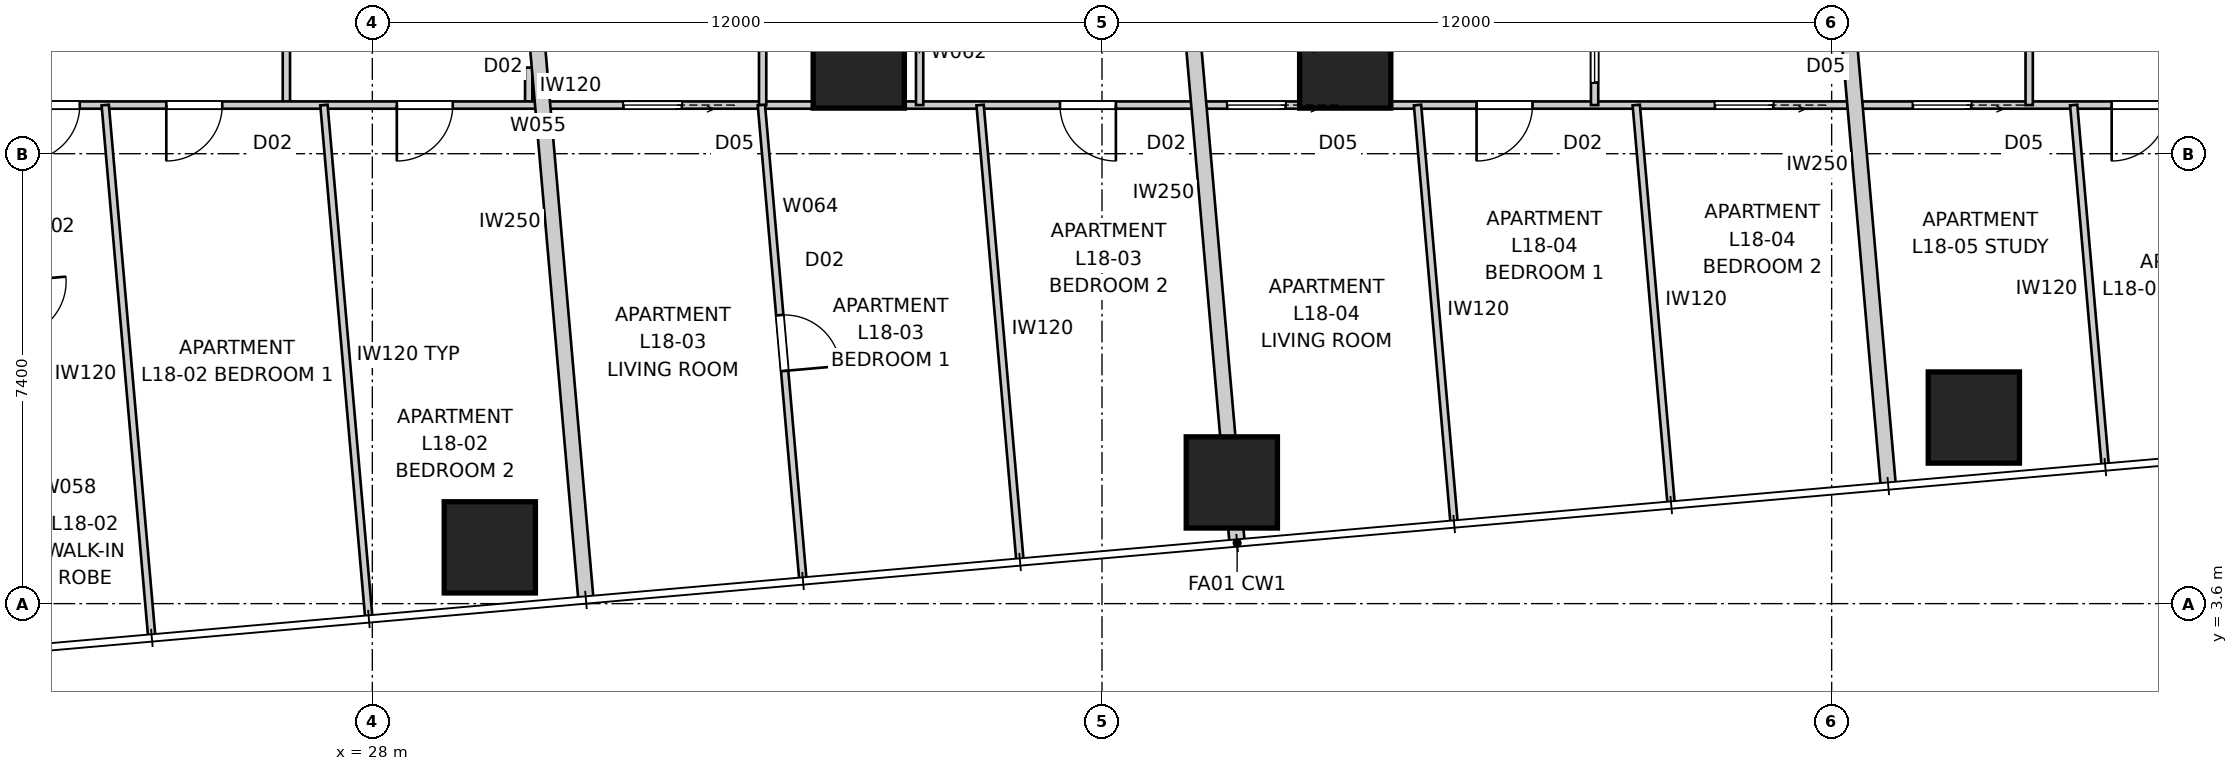
"""IFC4 building model, lengths in metres.
Left out: names, types, materials, properties, quantities, classifications, styles, units other than length and angle.
Written with IfcOpenShell. Run it as: python <this file> out.ifc"""

import sys

from ifc_helpers import new_model, si_unit, direction, frame, frame_2d, origin, origin_2d, place, context, subcontext, project, spatial, rectangle, extrude, element, fill, save


model = new_model("IFC4")
c1 = context("Model", 3, precision=1e-05, world=origin(), true_north=direction((0.0, 1.0)))
c2 = subcontext(c1, "Body", "Model", "MODEL_VIEW")
j1 = project(units=[si_unit("LENGTHUNIT", "METRE"), si_unit("PLANEANGLEUNIT", "RADIAN")], contexts=[c1])
p1 = place(None, origin())
s1 = spatial("IfcSite", under=j1, at=p1, CompositionType="ELEMENT")
p2 = place(p1, origin())
s2 = spatial("IfcBuilding", under=s1, at=p2, CompositionType="ELEMENT")
p3 = place(p2, frame((0.0, 0.0, 67.6)))
s3 = spatial("IfcBuildingStorey", under=s2, at=p3, CompositionType="ELEMENT", Elevation=67.6)
for number, where, z_axis, x_axis in (
    (1, (29.932, 4.526, 0.0), (0.0, 0.0, 1.0), (1.0, 0.0, 0.0)),
    (2, (42.135, 5.593, 0.0), (0.0, 0.0, 1.0), (1.0, 0.0, 0.0)),
    (3, (54.339, 6.661, 0.0), (0.0, 0.0, 1.0), (1.0, 0.0, 0.0)),
    (4, (36.0, 12.5, 0.0), (0.0, 0.0, 1.0), (1.0, 0.0, 0.0)),
    (5, (44.0, 12.5, 0.0), (0.0, 0.0, 1.0), (1.0, 0.0, 0.0)),
):
    element("IfcColumn", number, at=place(p3, frame(where, z_axis=z_axis, x_axis=x_axis)), inside=s3, PredefinedType="COLUMN", context=c2, shape_type="SweptSolid", body=[
        extrude(rectangle(XDim=1.5, YDim=1.5, at=origin_2d()), origin(), (0.0, 0.0, 1.0), 3.4),
    ])
p4 = place(p3, frame((42.222, 4.597, 0.0), z_axis=(0.0, 0.0, 1.0), x_axis=(-0.087147497287, 0.996195419442, 0.0)))
e6 = element("IfcWall", 6, at=p4, inside=s3, PredefinedType="PARTITIONING", context=c2, shape_type="SweptSolid", body=[
    extrude(rectangle(XDim=11.677, YDim=0.25, at=frame_2d((5.838, 0.0))), origin(), (0.0, 0.0, 1.0), 3.25),
])
p5 = place(p3, frame((52.932, 5.534, 0.0), z_axis=(0.0, 0.0, 1.0), x_axis=(-0.08716441141, 0.996193939644, 0.0)))
e7 = element("IfcWall", 7, at=p5, inside=s3, PredefinedType="PARTITIONING", context=c2, shape_type="SweptSolid", body=[
    extrude(rectangle(XDim=10.736, YDim=0.25, at=frame_2d((5.368, 0.0))), origin(), (0.0, 0.0, 1.0), 3.25),
])
p6 = place(p3, frame((31.513, 3.66, 0.0), z_axis=(0.0, 0.0, 1.0), x_axis=(-0.087153988028, 0.996194851608, 0.0)))
e8 = element("IfcWall", 8, at=p6, inside=s3, PredefinedType="PARTITIONING", context=c2, shape_type="SweptSolid", body=[
    extrude(rectangle(XDim=12.617, YDim=0.25, at=frame_2d((6.309, 0.0))), origin(), (0.0, 0.0, 1.0), 3.25),
])
p7 = place(p3, frame((26.586, 11.8, 0.0), z_axis=(0.0, 0.0, 1.0), x_axis=(0.0, 1.0, 0.0)))
e9 = element("IfcWall", 9, at=p7, inside=s3, PredefinedType="PARTITIONING", context=c2, shape_type="SweptSolid", body=[
    extrude(rectangle(XDim=4.4, YDim=0.12, at=frame_2d((2.2, 0.0))), origin(), (0.0, 0.0, 1.0), 3.25),
])
p8 = place(p7, frame((0.982, 0.0, 0.0)))
e10 = element("IfcOpeningElement", 10, at=p8, cuts=e9, PredefinedType="OPENING", context=c2, shape_type="SweptSolid", body=[
    extrude(rectangle(XDim=0.92, YDim=2.34, at=frame_2d((0.46, 1.17))), frame((0.0, 0.07, 0.0), z_axis=(0.0, -1.0, 0.0), x_axis=(1.0, 0.0, 0.0)), (0.0, 0.0, 1.0), 0.14),
])
p9 = place(p7, frame((3.112, 0.0, 0.0)))
e11 = element("IfcOpeningElement", 11, at=p9, cuts=e9, PredefinedType="OPENING", context=c2, shape_type="SweptSolid", body=[
    extrude(rectangle(XDim=0.96, YDim=2.1, at=frame_2d((0.48, 1.05))), frame((0.0, 0.07, 0.0), z_axis=(0.0, -1.0, 0.0), x_axis=(1.0, 0.0, 0.0)), (0.0, 0.0, 1.0), 0.14),
])
p10 = place(p3, frame((30.572, 12.417, 0.0), z_axis=(0.0, 0.0, 1.0), x_axis=(0.0, -1.0, 0.0)))
e12 = element("IfcWall", 12, at=p10, inside=s3, PredefinedType="PARTITIONING", context=c2, shape_type="SweptSolid", body=[
    extrude(rectangle(XDim=0.617, YDim=0.12, at=frame_2d((0.308, 0.0))), origin(), (0.0, 0.0, 1.0), 3.25),
])
p11 = place(p3, frame((58.2, 11.8, 0.0), z_axis=(0.0, 0.0, 1.0), x_axis=(-1.0, 0.0, 0.0)))
e13 = element("IfcWall", 13, at=p11, inside=s3, PredefinedType="PARTITIONING", context=c2, shape_type="SweptSolid", body=[
    extrude(rectangle(XDim=36.4, YDim=0.12, at=frame_2d((18.2, 0.0))), origin(), (0.0, 0.0, 1.0), 3.25),
])
p12 = place(p11, frame((11.12, 0.0, 0.0)))
e14 = element("IfcOpeningElement", 14, at=p12, cuts=e13, PredefinedType="OPENING", context=c2, shape_type="SweptSolid", body=[
    extrude(rectangle(XDim=0.92, YDim=2.34, at=frame_2d((0.46, 1.17))), frame((0.0, 0.07, 0.0), z_axis=(0.0, -1.0, 0.0), x_axis=(1.0, 0.0, 0.0)), (0.0, 0.0, 1.0), 0.14),
])
p13 = place(p11, frame((17.971, 0.0, 0.0)))
e15 = element("IfcOpeningElement", 15, at=p13, cuts=e13, PredefinedType="OPENING", context=c2, shape_type="SweptSolid", body=[
    extrude(rectangle(XDim=0.92, YDim=2.34, at=frame_2d((0.46, 1.17))), frame((0.0, 0.07, 0.0), z_axis=(0.0, -1.0, 0.0), x_axis=(1.0, 0.0, 0.0)), (0.0, 0.0, 1.0), 0.14),
])
p14 = place(p11, frame((28.877, 0.0, 0.0)))
e16 = element("IfcOpeningElement", 16, at=p14, cuts=e13, PredefinedType="OPENING", context=c2, shape_type="SweptSolid", body=[
    extrude(rectangle(XDim=0.92, YDim=2.34, at=frame_2d((0.46, 1.17))), frame((0.0, 0.07, 0.0), z_axis=(0.0, -1.0, 0.0), x_axis=(1.0, 0.0, 0.0)), (0.0, 0.0, 1.0), 0.14),
])
p15 = place(p11, frame((7.16, 0.0, 0.0)))
e17 = element("IfcOpeningElement", 17, at=p15, cuts=e13, PredefinedType="OPENING", context=c2, shape_type="SweptSolid", body=[
    extrude(rectangle(XDim=0.96, YDim=2.1, at=frame_2d((0.48, 1.05))), frame((0.0, 0.07, 0.0), z_axis=(0.0, -1.0, 0.0), x_axis=(1.0, 0.0, 0.0)), (0.0, 0.0, 1.0), 0.14),
])
p16 = place(p11, frame((15.181, 0.0, 0.0)))
e18 = element("IfcOpeningElement", 18, at=p16, cuts=e13, PredefinedType="OPENING", context=c2, shape_type="SweptSolid", body=[
    extrude(rectangle(XDim=0.96, YDim=2.1, at=frame_2d((0.48, 1.05))), frame((0.0, 0.07, 0.0), z_axis=(0.0, -1.0, 0.0), x_axis=(1.0, 0.0, 0.0)), (0.0, 0.0, 1.0), 0.14),
])
p17 = place(p11, frame((32.668, 0.0, 0.0)))
e19 = element("IfcOpeningElement", 19, at=p17, cuts=e13, PredefinedType="OPENING", context=c2, shape_type="SweptSolid", body=[
    extrude(rectangle(XDim=0.92, YDim=2.34, at=frame_2d((0.46, 1.17))), frame((0.0, 0.07, 0.0), z_axis=(0.0, -1.0, 0.0), x_axis=(1.0, 0.0, 0.0)), (0.0, 0.0, 1.0), 0.14),
])
p18 = place(p11, frame((35.011, 0.0, 0.0)))
e20 = element("IfcOpeningElement", 20, at=p18, cuts=e13, PredefinedType="OPENING", context=c2, shape_type="SweptSolid", body=[
    extrude(rectangle(XDim=0.92, YDim=2.34, at=frame_2d((0.46, 1.17))), frame((0.0, 0.07, 0.0), z_axis=(0.0, -1.0, 0.0), x_axis=(1.0, 0.0, 0.0)), (0.0, 0.0, 1.0), 0.14),
])
p19 = place(p11, frame((0.675, 0.0, 0.0)))
e21 = element("IfcOpeningElement", 21, at=p19, cuts=e13, PredefinedType="OPENING", context=c2, shape_type="SweptSolid", body=[
    extrude(rectangle(XDim=0.92, YDim=2.34, at=frame_2d((0.46, 1.17))), frame((0.0, 0.07, 0.0), z_axis=(0.0, -1.0, 0.0), x_axis=(1.0, 0.0, 0.0)), (0.0, 0.0, 1.0), 0.14),
])
p20 = place(p11, frame((25.11, 0.0, 0.0)))
e22 = element("IfcOpeningElement", 22, at=p20, cuts=e13, PredefinedType="OPENING", context=c2, shape_type="SweptSolid", body=[
    extrude(rectangle(XDim=0.96, YDim=2.1, at=frame_2d((0.48, 1.05))), frame((0.0, 0.07, 0.0), z_axis=(0.0, -1.0, 0.0), x_axis=(1.0, 0.0, 0.0)), (0.0, 0.0, 1.0), 0.14),
])
p21 = place(p11, frame((3.904, 0.0, 0.0)))
e23 = element("IfcOpeningElement", 23, at=p21, cuts=e13, PredefinedType="OPENING", context=c2, shape_type="SweptSolid", body=[
    extrude(rectangle(XDim=0.96, YDim=2.1, at=frame_2d((0.48, 1.05))), frame((0.0, 0.07, 0.0), z_axis=(0.0, -1.0, 0.0), x_axis=(1.0, 0.0, 0.0)), (0.0, 0.0, 1.0), 0.14),
])
p22 = place(p3, frame((27.204, 11.8, 0.0), z_axis=(0.0, 0.0, 1.0), x_axis=(0.087167308925, -0.996193686115, 0.0)))
e24 = element("IfcWall", 24, at=p22, inside=s3, PredefinedType="PARTITIONING", context=c2, shape_type="SweptSolid", body=[
    extrude(rectangle(XDim=8.445, YDim=0.12, at=frame_2d((4.222, 0.0))), origin(), (0.0, 0.0, 1.0), 2.638),
])
p23 = place(p3, frame((24.371, 3.075, 0.0), z_axis=(0.0, 0.0, 1.0), x_axis=(-0.087169716747, 0.996193475426, 0.0)))
e25 = element("IfcWall", 25, at=p23, inside=s3, PredefinedType="PARTITIONING", context=c2, shape_type="SweptSolid", body=[
    extrude(rectangle(XDim=8.758, YDim=0.12, at=frame_2d((4.379, 0.0))), origin(), (0.0, 0.0, 1.0), 3.25),
])
p24 = place(p3, frame((37.0, 11.8, 0.0), z_axis=(0.0, 0.0, 1.0), x_axis=(0.0, 1.0, 0.0)))
e26 = element("IfcWall", 26, at=p24, inside=s3, PredefinedType="PARTITIONING", context=c2, shape_type="SweptSolid", body=[
    extrude(rectangle(XDim=4.4, YDim=0.12, at=frame_2d((2.2, 0.0))), origin(), (0.0, 0.0, 1.0), 2.796),
])
p25 = place(p24, frame((1.72, 0.0, 0.0)))
e27 = element("IfcOpeningElement", 27, at=p25, cuts=e26, PredefinedType="OPENING", context=c2, shape_type="SweptSolid", body=[
    extrude(rectangle(XDim=0.96, YDim=2.1, at=frame_2d((0.48, 1.05))), frame((0.0, 0.07, 0.0), z_axis=(0.0, -1.0, 0.0), x_axis=(1.0, 0.0, 0.0)), (0.0, 0.0, 1.0), 0.14),
])
p26 = place(p3, frame((34.419, 16.2, 0.0), z_axis=(0.0, 0.0, 1.0), x_axis=(0.0, -1.0, 0.0)))
e28 = element("IfcWall", 28, at=p26, inside=s3, PredefinedType="PARTITIONING", context=c2, shape_type="SweptSolid", body=[
    extrude(rectangle(XDim=4.4, YDim=0.12, at=frame_2d((2.2, 0.0))), origin(), (0.0, 0.0, 1.0), 3.25),
])
p27 = place(p26, frame((1.72, 0.0, 0.0)))
e29 = element("IfcOpeningElement", 29, at=p27, cuts=e28, PredefinedType="OPENING", context=c2, shape_type="SweptSolid", body=[
    extrude(rectangle(XDim=0.96, YDim=2.1, at=frame_2d((0.48, 1.05))), frame((0.0, 0.07, 0.0), z_axis=(0.0, -1.0, 0.0), x_axis=(1.0, 0.0, 0.0)), (0.0, 0.0, 1.0), 0.14),
])
p28 = place(p3, frame((34.398, 11.8, 0.0), z_axis=(0.0, 0.0, 1.0), x_axis=(0.087161914023, -0.996194158156, 0.0)))
e30 = element("IfcWall", 30, at=p28, inside=s3, PredefinedType="PARTITIONING", context=c2, shape_type="SweptSolid", body=[
    extrude(rectangle(XDim=7.818, YDim=0.12, at=frame_2d((3.909, 0.0))), origin(), (0.0, 0.0, 1.0), 3.25),
])
p29 = place(p28, frame((3.469, 0.0, 0.0)))
e31 = element("IfcOpeningElement", 31, at=p29, cuts=e30, PredefinedType="OPENING", context=c2, shape_type="SweptSolid", body=[
    extrude(rectangle(XDim=0.92, YDim=2.34, at=frame_2d((0.46, 1.17))), frame((0.0, 0.07, 0.0), z_axis=(0.0, -1.0, 0.0), x_axis=(1.0, 0.0, 0.0)), (0.0, 0.0, 1.0), 0.14),
])
p30 = place(p3, frame((37.995, 11.8, 0.0), z_axis=(0.0, 0.0, 1.0), x_axis=(0.08715887855, -0.99619442374, 0.0)))
e32 = element("IfcWall", 32, at=p30, inside=s3, PredefinedType="PARTITIONING", context=c2, shape_type="SweptSolid", body=[
    extrude(rectangle(XDim=7.504, YDim=0.12, at=frame_2d((3.752, 0.0))), origin(), (0.0, 0.0, 1.0), 3.25),
])
p31 = place(p3, frame((48.101, 16.2, 0.0), z_axis=(0.0, 0.0, 1.0), x_axis=(0.0, -1.0, 0.0)))
e33 = element("IfcWall", 33, at=p31, inside=s3, PredefinedType="PARTITIONING", context=c2, shape_type="SweptSolid", body=[
    extrude(rectangle(XDim=4.4, YDim=0.12, at=frame_2d((2.2, 0.0))), origin(), (0.0, 0.0, 1.0), 3.25),
])
p32 = place(p31, frame((3.07, 0.0, 0.0)))
e34 = element("IfcOpeningElement", 34, at=p32, cuts=e33, PredefinedType="OPENING", context=c2, shape_type="SweptSolid", body=[
    extrude(rectangle(XDim=0.96, YDim=2.1, at=frame_2d((0.48, 1.05))), frame((0.0, 0.07, 0.0), z_axis=(0.0, -1.0, 0.0), x_axis=(1.0, 0.0, 0.0)), (0.0, 0.0, 1.0), 0.14),
])
p33 = place(p3, frame((43.486, 11.8, 0.0), z_axis=(0.0, 0.0, 1.0), x_axis=(0.0, 1.0, 0.0)))
e35 = element("IfcWall", 35, at=p33, inside=s3, PredefinedType="PARTITIONING", context=c2, shape_type="SweptSolid", body=[
    extrude(rectangle(XDim=4.4, YDim=0.12, at=frame_2d((2.2, 0.0))), origin(), (0.0, 0.0, 1.0), 3.25),
])
p34 = place(p33, frame((1.72, 0.0, 0.0)))
e36 = element("IfcOpeningElement", 36, at=p34, cuts=e35, PredefinedType="OPENING", context=c2, shape_type="SweptSolid", body=[
    extrude(rectangle(XDim=0.96, YDim=2.1, at=frame_2d((0.48, 1.05))), frame((0.0, 0.07, 0.0), z_axis=(0.0, -1.0, 0.0), x_axis=(1.0, 0.0, 0.0)), (0.0, 0.0, 1.0), 0.14),
])
p35 = place(p3, frame((45.189, 11.8, 0.0), z_axis=(0.0, 0.0, 1.0), x_axis=(0.087190290923, -0.996191674914, 0.0)))
e37 = element("IfcWall", 37, at=p35, inside=s3, PredefinedType="PARTITIONING", context=c2, shape_type="SweptSolid", body=[
    extrude(rectangle(XDim=6.877, YDim=0.12, at=frame_2d((3.438, 0.0))), origin(), (0.0, 0.0, 1.0), 3.25),
])
p36 = place(p3, frame((48.786, 11.8, 0.0), z_axis=(0.0, 0.0, 1.0), x_axis=(0.087151261897, -0.996195090105, 0.0)))
e38 = element("IfcWall", 38, at=p36, inside=s3, PredefinedType="PARTITIONING", context=c2, shape_type="SweptSolid", body=[
    extrude(rectangle(XDim=6.563, YDim=0.12, at=frame_2d((3.282, 0.0))), origin(), (0.0, 0.0, 1.0), 3.25),
])
p37 = place(p3, frame((55.249, 16.594, 0.0), z_axis=(0.0, 0.0, 1.0), x_axis=(0.0, -1.0, 0.0)))
e39 = element("IfcWall", 39, at=p37, inside=s3, PredefinedType="PARTITIONING", context=c2, shape_type="SweptSolid", body=[
    extrude(rectangle(XDim=4.794, YDim=0.12, at=frame_2d((2.397, 0.0))), origin(), (0.0, 0.0, 1.0), 3.25),
])
p38 = place(p37, frame((2.114, 0.0, 0.0)))
e40 = element("IfcOpeningElement", 40, at=p38, cuts=e39, PredefinedType="OPENING", context=c2, shape_type="SweptSolid", body=[
    extrude(rectangle(XDim=0.96, YDim=2.1, at=frame_2d((0.48, 1.05))), frame((0.0, 0.07, 0.0), z_axis=(0.0, -1.0, 0.0), x_axis=(1.0, 0.0, 0.0)), (0.0, 0.0, 1.0), 0.14),
])
p39 = place(p3, frame((56.498, 5.886, 0.0), z_axis=(0.0, 0.0, 1.0), x_axis=(-0.087146033323, 0.996195547509, 0.0)))
e41 = element("IfcWall", 41, at=p39, inside=s3, PredefinedType="PARTITIONING", context=c2, shape_type="SweptSolid", body=[
    extrude(rectangle(XDim=5.937, YDim=0.12, at=frame_2d((2.968, 0.0))), origin(), (0.0, 0.0, 1.0), 2.638),
])
p40 = place(p32, origin())
e42 = element("IfcDoor", 42, at=p40, inside=s3, OperationType="SLIDING_TO_LEFT", PredefinedType="DOOR", context=c2, shape_type="SweptSolid", body=[
    extrude(rectangle(XDim=0.96, YDim=2.1, at=frame_2d((0.48, 1.05))), frame((0.0, 0.025, 0.0), z_axis=(0.0, -1.0, 0.0), x_axis=(1.0, 0.0, 0.0)), (0.0, 0.0, 1.0), 0.05),
])
fill(e34, e42)
p41 = place(p12, origin())
e43 = element("IfcDoor", 43, at=p41, inside=s3, OperationType="SINGLE_SWING_RIGHT", PredefinedType="DOOR", context=c2, shape_type="SweptSolid", body=[
    extrude(rectangle(XDim=0.92, YDim=2.34, at=frame_2d((0.46, 1.17))), frame((0.0, 0.025, 0.0), z_axis=(0.0, -1.0, 0.0), x_axis=(1.0, 0.0, 0.0)), (0.0, 0.0, 1.0), 0.05),
])
fill(e14, e43)
p42 = place(p13, origin())
e44 = element("IfcDoor", 44, at=p42, inside=s3, OperationType="SINGLE_SWING_LEFT", PredefinedType="DOOR", context=c2, shape_type="SweptSolid", body=[
    extrude(rectangle(XDim=0.92, YDim=2.34, at=frame_2d((0.46, 1.17))), frame((0.0, 0.025, 0.0), z_axis=(0.0, -1.0, 0.0), x_axis=(1.0, 0.0, 0.0)), (0.0, 0.0, 1.0), 0.05),
])
fill(e15, e44)
p43 = place(p14, origin())
e45 = element("IfcDoor", 45, at=p43, inside=s3, OperationType="SINGLE_SWING_RIGHT", PredefinedType="DOOR", context=c2, shape_type="SweptSolid", body=[
    extrude(rectangle(XDim=0.92, YDim=2.34, at=frame_2d((0.46, 1.17))), frame((0.0, 0.025, 0.0), z_axis=(0.0, -1.0, 0.0), x_axis=(1.0, 0.0, 0.0)), (0.0, 0.0, 1.0), 0.05),
])
fill(e16, e45)
p44 = place(p15, origin())
e46 = element("IfcDoor", 46, at=p44, inside=s3, OperationType="SLIDING_TO_LEFT", PredefinedType="DOOR", context=c2, shape_type="SweptSolid", body=[
    extrude(rectangle(XDim=0.96, YDim=2.1, at=frame_2d((0.48, 1.05))), frame((0.0, 0.025, 0.0), z_axis=(0.0, -1.0, 0.0), x_axis=(1.0, 0.0, 0.0)), (0.0, 0.0, 1.0), 0.05),
])
fill(e17, e46)
p45 = place(p16, origin())
e47 = element("IfcDoor", 47, at=p45, inside=s3, OperationType="SLIDING_TO_LEFT", PredefinedType="DOOR", context=c2, shape_type="SweptSolid", body=[
    extrude(rectangle(XDim=0.96, YDim=2.1, at=frame_2d((0.48, 1.05))), frame((0.0, 0.025, 0.0), z_axis=(0.0, -1.0, 0.0), x_axis=(1.0, 0.0, 0.0)), (0.0, 0.0, 1.0), 0.05),
])
fill(e18, e47)
p46 = place(p17, origin())
e48 = element("IfcDoor", 48, at=p46, inside=s3, OperationType="SINGLE_SWING_RIGHT", PredefinedType="DOOR", context=c2, shape_type="SweptSolid", body=[
    extrude(rectangle(XDim=0.92, YDim=2.34, at=frame_2d((0.46, 1.17))), frame((0.0, 0.025, 0.0), z_axis=(0.0, -1.0, 0.0), x_axis=(1.0, 0.0, 0.0)), (0.0, 0.0, 1.0), 0.05),
])
fill(e19, e48)
p47 = place(p18, origin())
e49 = element("IfcDoor", 49, at=p47, inside=s3, OperationType="SINGLE_SWING_RIGHT", PredefinedType="DOOR", context=c2, shape_type="SweptSolid", body=[
    extrude(rectangle(XDim=0.92, YDim=2.34, at=frame_2d((0.46, 1.17))), frame((0.0, 0.025, 0.0), z_axis=(0.0, -1.0, 0.0), x_axis=(1.0, 0.0, 0.0)), (0.0, 0.0, 1.0), 0.05),
])
fill(e20, e49)
p48 = place(p19, origin())
e50 = element("IfcDoor", 50, at=p48, inside=s3, OperationType="SINGLE_SWING_RIGHT", PredefinedType="DOOR", context=c2, shape_type="SweptSolid", body=[
    extrude(rectangle(XDim=0.92, YDim=2.34, at=frame_2d((0.46, 1.17))), frame((0.0, 0.025, 0.0), z_axis=(0.0, -1.0, 0.0), x_axis=(1.0, 0.0, 0.0)), (0.0, 0.0, 1.0), 0.05),
])
fill(e21, e50)
p49 = place(p20, origin())
e51 = element("IfcDoor", 51, at=p49, inside=s3, OperationType="SLIDING_TO_LEFT", PredefinedType="DOOR", context=c2, shape_type="SweptSolid", body=[
    extrude(rectangle(XDim=0.96, YDim=2.1, at=frame_2d((0.48, 1.05))), frame((0.0, 0.025, 0.0), z_axis=(0.0, -1.0, 0.0), x_axis=(1.0, 0.0, 0.0)), (0.0, 0.0, 1.0), 0.05),
])
fill(e22, e51)
p50 = place(p21, origin())
e52 = element("IfcDoor", 52, at=p50, inside=s3, OperationType="SLIDING_TO_LEFT", PredefinedType="DOOR", context=c2, shape_type="SweptSolid", body=[
    extrude(rectangle(XDim=0.96, YDim=2.1, at=frame_2d((0.48, 1.05))), frame((0.0, 0.025, 0.0), z_axis=(0.0, -1.0, 0.0), x_axis=(1.0, 0.0, 0.0)), (0.0, 0.0, 1.0), 0.05),
])
fill(e23, e52)
p51 = place(p29, origin())
e53 = element("IfcDoor", 53, at=p51, inside=s3, OperationType="SINGLE_SWING_RIGHT", PredefinedType="DOOR", context=c2, shape_type="SweptSolid", body=[
    extrude(rectangle(XDim=0.92, YDim=2.34, at=frame_2d((0.46, 1.17))), frame((0.0, 0.025, 0.0), z_axis=(0.0, -1.0, 0.0), x_axis=(1.0, 0.0, 0.0)), (0.0, 0.0, 1.0), 0.05),
])
fill(e31, e53)
save(model, sys.argv[1])
